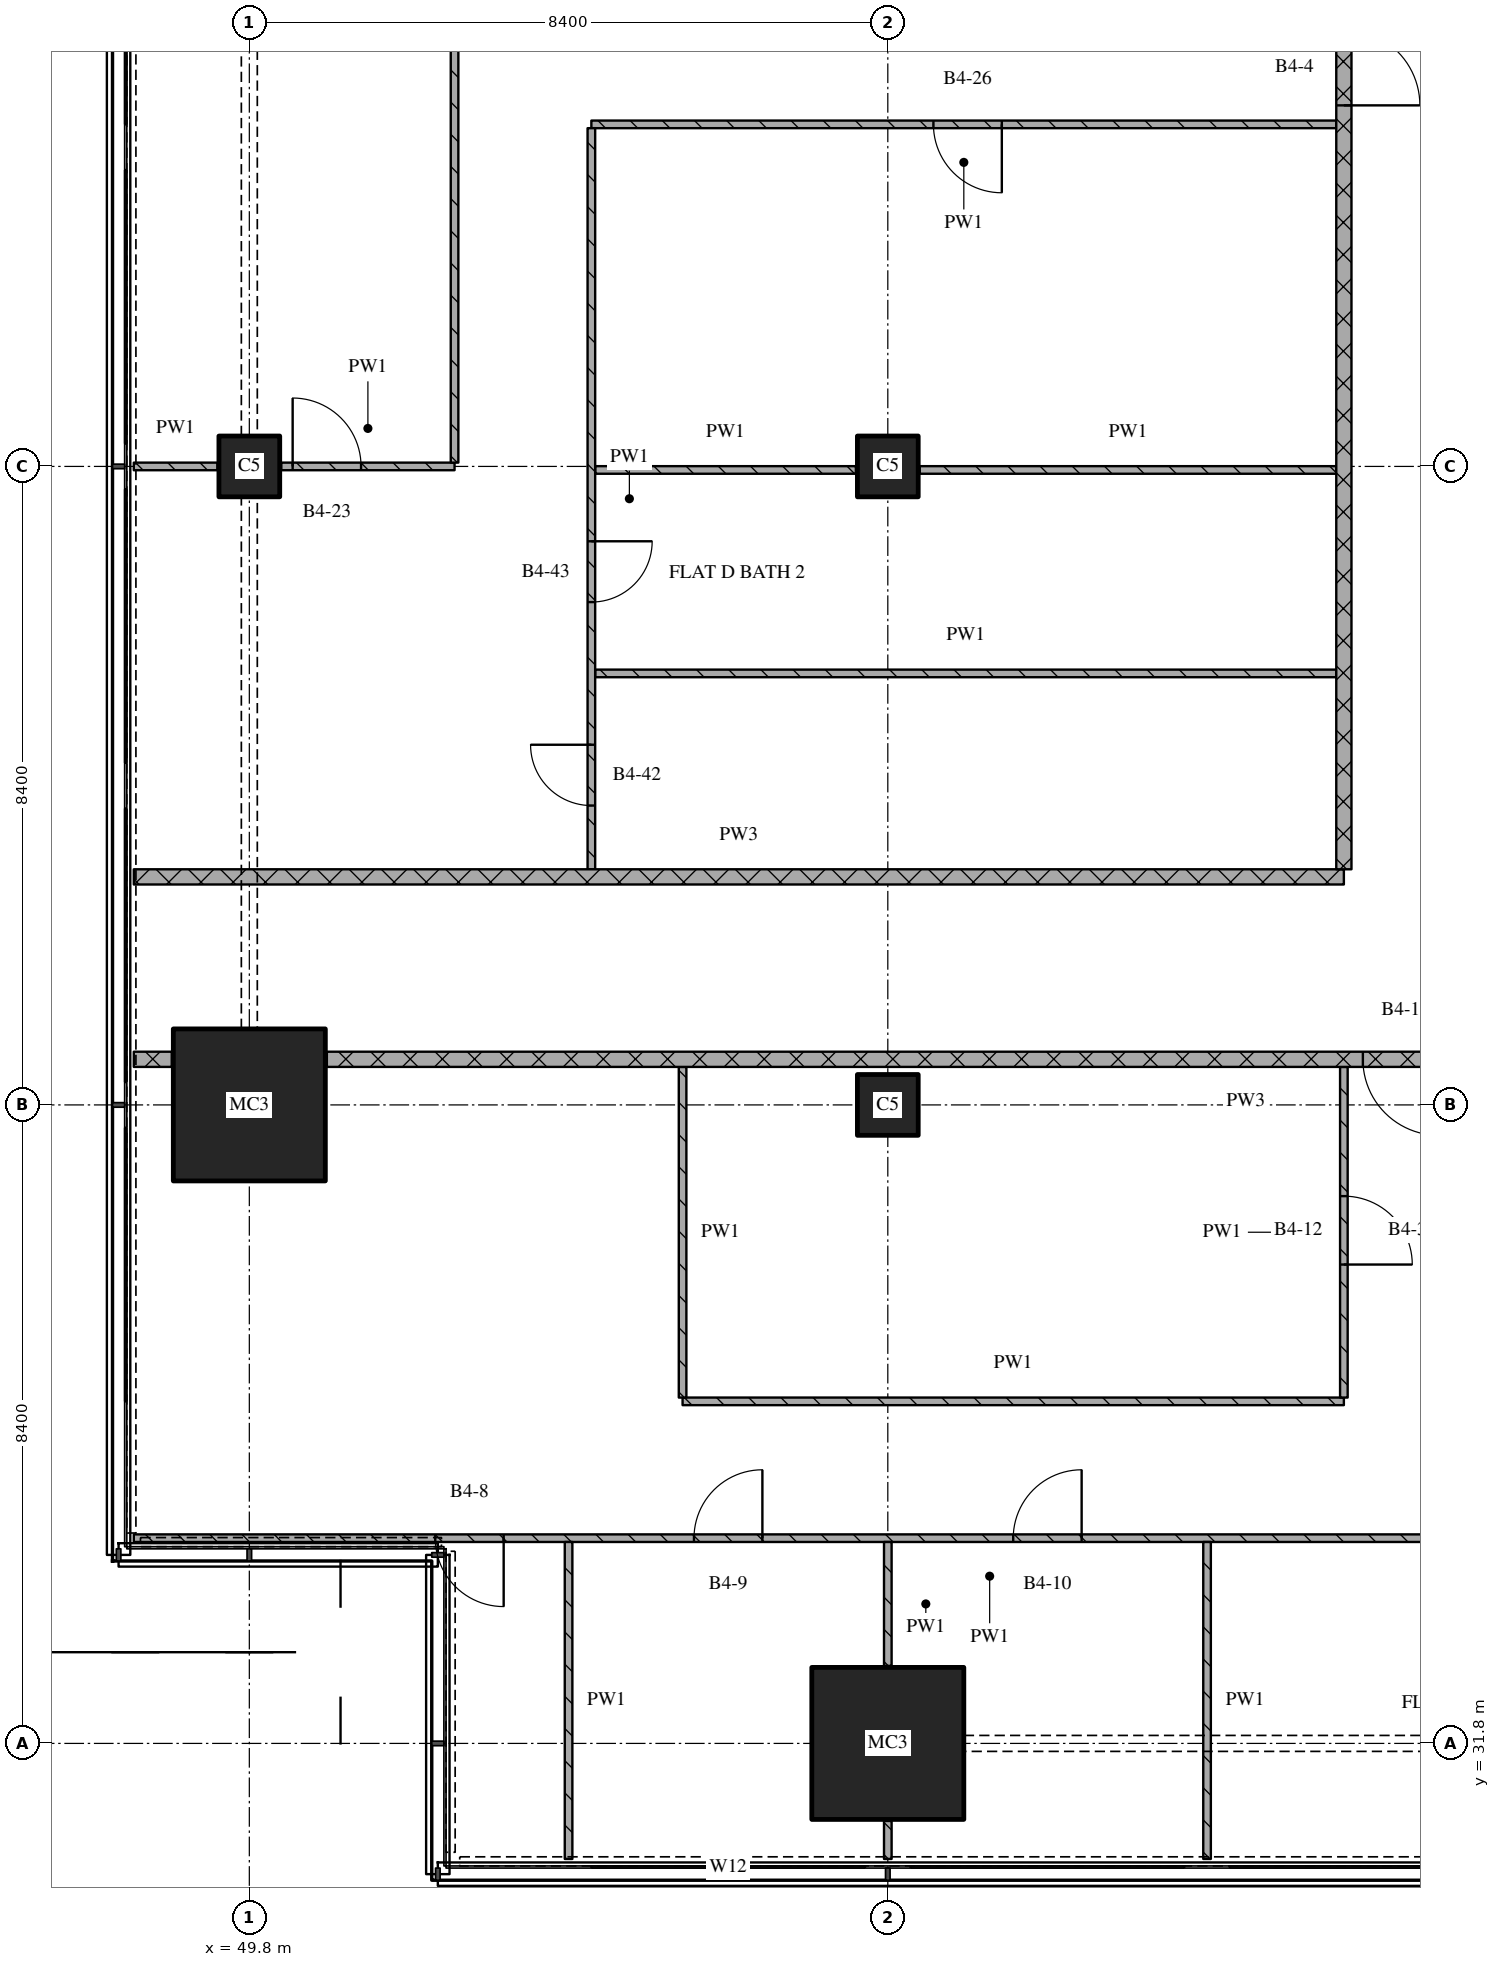
"""IFC4 building model, lengths in metres.
Left out: names, types, materials, properties, quantities, classifications, styles, units other than length and angle.
Written with IfcOpenShell. Run it as: python <this file> out.ifc"""

import sys

from ifc_helpers import new_model, si_unit, direction, frame, frame_2d, origin, origin_2d, place, context, subcontext, project, spatial, rectangle, extrude, element, fill, save


model = new_model("IFC4")
c1 = context("Model", 3, precision=1e-05, world=origin(), true_north=direction((0.0, 1.0)))
c2 = subcontext(c1, "Body", "Model", "MODEL_VIEW")
j1 = project(units=[si_unit("LENGTHUNIT", "METRE"), si_unit("PLANEANGLEUNIT", "RADIAN")], contexts=[c1])
p1 = place(None, origin())
s1 = spatial("IfcSite", under=j1, at=p1, CompositionType="ELEMENT")
p2 = place(p1, origin())
s2 = spatial("IfcBuilding", under=s1, at=p2, CompositionType="ELEMENT")
p3 = place(p2, frame((0.0, 0.0, 134.85)))
s3 = spatial("IfcBuildingStorey", under=s2, at=p3, CompositionType="ELEMENT", Elevation=134.85)
p4 = place(p3, frame((49.8, 40.2, 0.0), z_axis=(0.0, 0.0, 1.0), x_axis=(1.0, 0.0, 0.0)))
e1 = element("IfcColumn", 1, at=p4, inside=s3, PredefinedType="COLUMN", context=c2, shape_type="SweptSolid", body=[
    extrude(rectangle(XDim=2.0, YDim=2.0, at=origin_2d()), origin(), (0.0, 0.0, 1.0), 3.6),
])
p5 = place(p3, frame((49.8, 48.6, 0.0), z_axis=(0.0, 0.0, 1.0), x_axis=(1.0, 0.0, 0.0)))
e2 = element("IfcColumn", 2, at=p5, inside=s3, PredefinedType="COLUMN", context=c2, shape_type="SweptSolid", body=[
    extrude(rectangle(XDim=0.8, YDim=0.8, at=origin_2d()), origin(), (0.0, 0.0, 1.0), 3.6),
])
p6 = place(p3, frame((58.2, 31.8, 0.0), z_axis=(0.0, 0.0, 1.0), x_axis=(1.0, 0.0, 0.0)))
e3 = element("IfcColumn", 3, at=p6, inside=s3, PredefinedType="COLUMN", context=c2, shape_type="SweptSolid", body=[
    extrude(rectangle(XDim=2.0, YDim=2.0, at=origin_2d()), origin(), (0.0, 0.0, 1.0), 3.6),
])
for number, where, z_axis, x_axis in (
    (4, (58.2, 40.2, 0.0), (0.0, 0.0, 1.0), (1.0, 0.0, 0.0)),
    (5, (58.2, 48.6, 0.0), (0.0, 0.0, 1.0), (1.0, 0.0, 0.0)),
):
    element("IfcColumn", number, at=place(p3, frame(where, z_axis=z_axis, x_axis=x_axis)), inside=s3, PredefinedType="COLUMN", context=c2, shape_type="SweptSolid", body=[
        extrude(rectangle(XDim=0.8, YDim=0.8, at=origin_2d()), origin(), (0.0, 0.0, 1.0), 3.6),
    ])
p7 = place(p3, frame((70.8, 34.5, 0.0), z_axis=(0.0, 0.0, 1.0), x_axis=(-1.0, 0.0, 0.0)))
e6 = element("IfcWall", 6, at=p7, inside=s3, PredefinedType="PARTITIONING", context=c2, shape_type="SweptSolid", body=[
    extrude(rectangle(XDim=22.52, YDim=0.1, at=frame_2d((11.26, 0.0))), origin(), (0.0, 0.0, 1.0), 3.32),
])
p8 = place(p7, frame((10.05, 0.0, 0.0)))
e7 = element("IfcOpeningElement", 7, at=p8, cuts=e6, PredefinedType="OPENING", context=c2, shape_type="SweptSolid", body=[
    extrude(rectangle(XDim=0.9, YDim=2.1, at=frame_2d((0.45, 1.05))), frame((0.0, 0.06, 0.0), z_axis=(0.0, -1.0, 0.0), x_axis=(1.0, 0.0, 0.0)), (0.0, 0.0, 1.0), 0.12),
])
p9 = place(p7, frame((14.25, 0.0, 0.0)))
e8 = element("IfcOpeningElement", 8, at=p9, cuts=e6, PredefinedType="OPENING", context=c2, shape_type="SweptSolid", body=[
    extrude(rectangle(XDim=0.9, YDim=2.1, at=frame_2d((0.45, 1.05))), frame((0.0, 0.06, 0.0), z_axis=(0.0, -1.0, 0.0), x_axis=(1.0, 0.0, 0.0)), (0.0, 0.0, 1.0), 0.12),
])
p10 = place(p7, frame((17.654, 0.0, 0.0)))
e9 = element("IfcOpeningElement", 9, at=p10, cuts=e6, PredefinedType="OPENING", context=c2, shape_type="SweptSolid", body=[
    extrude(rectangle(XDim=0.9, YDim=2.1, at=frame_2d((0.45, 1.05))), frame((0.0, 0.06, 0.0), z_axis=(0.0, -1.0, 0.0), x_axis=(1.0, 0.0, 0.0)), (0.0, 0.0, 1.0), 0.12),
])
p11 = place(p3, frame((55.5, 36.3, 0.0), z_axis=(0.0, 0.0, 1.0), x_axis=(1.0, 0.0, 0.0)))
e10 = element("IfcWall", 10, at=p11, inside=s3, PredefinedType="PARTITIONING", context=c2, shape_type="SweptSolid", body=[
    extrude(rectangle(XDim=8.7, YDim=0.1, at=frame_2d((4.35, 0.0))), origin(), (0.0, 0.0, 1.0), 3.32),
])
p12 = place(p3, frame((48.28, 40.8, 0.0), z_axis=(0.0, 0.0, 1.0), x_axis=(1.0, 0.0, 0.0)))
e11 = element("IfcWall", 11, at=p12, inside=s3, PredefinedType="PARTITIONING", context=c2, shape_type="SweptSolid", body=[
    extrude(rectangle(XDim=0.5, YDim=0.2, at=frame_2d((0.25, 0.0))), origin(), (0.0, 0.0, 1.0), 3.32),
])
p13 = place(p3, frame((75.0, 40.8, 0.0), z_axis=(0.0, 0.0, 1.0), x_axis=(-1.0, 0.0, 0.0)))
e12 = element("IfcWall", 12, at=p13, inside=s3, PredefinedType="PARTITIONING", context=c2, shape_type="SweptSolid", body=[
    extrude(rectangle(XDim=24.18, YDim=0.2, at=frame_2d((12.09, 0.0))), origin(), (0.0, 0.0, 1.0), 3.32),
])
p14 = place(p13, frame((9.55, 0.0, 0.0)))
e13 = element("IfcOpeningElement", 13, at=p14, cuts=e12, PredefinedType="OPENING", context=c2, shape_type="SweptSolid", body=[
    extrude(rectangle(XDim=1.0, YDim=2.1, at=frame_2d((0.5, 1.05))), frame((0.0, 0.11, 0.0), z_axis=(0.0, -1.0, 0.0), x_axis=(1.0, 0.0, 0.0)), (0.0, 0.0, 1.0), 0.22),
])
p15 = place(p3, frame((48.28, 43.2, 0.0), z_axis=(0.0, 0.0, 1.0), x_axis=(1.0, 0.0, 0.0)))
e14 = element("IfcWall", 14, at=p15, inside=s3, PredefinedType="PARTITIONING", context=c2, shape_type="SweptSolid", body=[
    extrude(rectangle(XDim=15.92, YDim=0.2, at=frame_2d((7.96, 0.0))), origin(), (0.0, 0.0, 1.0), 3.32),
])
p16 = place(p3, frame((54.35, 45.877, 0.0), z_axis=(0.0, 0.0, 1.0), x_axis=(1.0, 0.0, 0.0)))
e15 = element("IfcWall", 15, at=p16, inside=s3, PredefinedType="PARTITIONING", context=c2, shape_type="SweptSolid", body=[
    extrude(rectangle(XDim=9.75, YDim=0.1, at=frame_2d((4.875, 0.0))), origin(), (0.0, 0.0, 1.0), 3.32),
])
p17 = place(p3, frame((54.35, 48.553, 0.0), z_axis=(0.0, 0.0, 1.0), x_axis=(1.0, 0.0, 0.0)))
e16 = element("IfcWall", 16, at=p17, inside=s3, PredefinedType="PARTITIONING", context=c2, shape_type="SweptSolid", body=[
    extrude(rectangle(XDim=3.43, YDim=0.1, at=frame_2d((1.715, 0.0))), origin(), (0.0, 0.0, 1.0), 3.32),
])
p18 = place(p3, frame((58.62, 48.553, 0.0), z_axis=(0.0, 0.0, 1.0), x_axis=(1.0, 0.0, 0.0)))
e17 = element("IfcWall", 17, at=p18, inside=s3, PredefinedType="PARTITIONING", context=c2, shape_type="SweptSolid", body=[
    extrude(rectangle(XDim=5.48, YDim=0.1, at=frame_2d((2.74, 0.0))), origin(), (0.0, 0.0, 1.0), 3.32),
])
p19 = place(p3, frame((48.28, 48.6, 0.0), z_axis=(0.0, 0.0, 1.0), x_axis=(1.0, 0.0, 0.0)))
e18 = element("IfcWall", 18, at=p19, inside=s3, PredefinedType="PARTITIONING", context=c2, shape_type="SweptSolid", body=[
    extrude(rectangle(XDim=1.1, YDim=0.1, at=frame_2d((0.55, 0.0))), origin(), (0.0, 0.0, 1.0), 3.32),
])
p20 = place(p3, frame((50.22, 48.6, 0.0), z_axis=(0.0, 0.0, 1.0), x_axis=(1.0, 0.0, 0.0)))
e19 = element("IfcWall", 19, at=p20, inside=s3, PredefinedType="PARTITIONING", context=c2, shape_type="SweptSolid", body=[
    extrude(rectangle(XDim=2.28, YDim=0.1, at=frame_2d((1.14, 0.0))), origin(), (0.0, 0.0, 1.0), 3.32),
])
p21 = place(p20, frame((0.15, 0.0, 0.0)))
e20 = element("IfcOpeningElement", 20, at=p21, cuts=e19, PredefinedType="OPENING", context=c2, shape_type="SweptSolid", body=[
    extrude(rectangle(XDim=0.9, YDim=2.1, at=frame_2d((0.45, 1.05))), frame((0.0, 0.06, 0.0), z_axis=(0.0, -1.0, 0.0), x_axis=(1.0, 0.0, 0.0)), (0.0, 0.0, 1.0), 0.12),
])
p22 = place(p3, frame((64.1, 53.1, 0.0), z_axis=(0.0, 0.0, 1.0), x_axis=(-1.0, 0.0, 0.0)))
e21 = element("IfcWall", 21, at=p22, inside=s3, PredefinedType="PARTITIONING", context=c2, shape_type="SweptSolid", body=[
    extrude(rectangle(XDim=9.8, YDim=0.1, at=frame_2d((4.9, 0.0))), origin(), (0.0, 0.0, 1.0), 3.32),
])
p23 = place(p22, frame((4.4, 0.0, 0.0)))
e22 = element("IfcOpeningElement", 22, at=p23, cuts=e21, PredefinedType="OPENING", context=c2, shape_type="SweptSolid", body=[
    extrude(rectangle(XDim=0.9, YDim=2.1, at=frame_2d((0.45, 1.05))), frame((0.0, 0.06, 0.0), z_axis=(0.0, -1.0, 0.0), x_axis=(1.0, 0.0, 0.0)), (0.0, 0.0, 1.0), 0.12),
])
p24 = place(p3, frame((52.5, 48.65, 0.0), z_axis=(0.0, 0.0, 1.0), x_axis=(0.0, 1.0, 0.0)))
e23 = element("IfcWall", 23, at=p24, inside=s3, PredefinedType="PARTITIONING", context=c2, shape_type="SweptSolid", body=[
    extrude(rectangle(XDim=16.65, YDim=0.1, at=frame_2d((8.325, 0.0))), origin(), (0.0, 0.0, 1.0), 3.32),
])
p25 = place(p24, frame((12.1, 0.0, 0.0)))
e24 = element("IfcOpeningElement", 24, at=p25, cuts=e23, PredefinedType="OPENING", context=c2, shape_type="SweptSolid", body=[
    extrude(rectangle(XDim=0.9, YDim=2.1, at=frame_2d((0.45, 1.05))), frame((0.0, 0.06, 0.0), z_axis=(0.0, -1.0, 0.0), x_axis=(1.0, 0.0, 0.0)), (0.0, 0.0, 1.0), 0.12),
])
p26 = place(p3, frame((54.0, 34.45, 0.0), z_axis=(0.0, 0.0, 1.0), x_axis=(0.0, -1.0, 0.0)))
e25 = element("IfcWall", 25, at=p26, inside=s3, PredefinedType="PARTITIONING", context=c2, shape_type="SweptSolid", body=[
    extrude(rectangle(XDim=4.17, YDim=0.1, at=frame_2d((2.085, 0.0))), origin(), (0.0, 0.0, 1.0), 3.32),
])
p27 = place(p3, frame((54.3, 53.05, 0.0), z_axis=(0.0, 0.0, 1.0), x_axis=(0.0, -1.0, 0.0)))
e26 = element("IfcWall", 26, at=p27, inside=s3, PredefinedType="PARTITIONING", context=c2, shape_type="SweptSolid", body=[
    extrude(rectangle(XDim=9.75, YDim=0.1, at=frame_2d((4.875, 0.0))), origin(), (0.0, 0.0, 1.0), 3.32),
])
p28 = place(p27, frame((5.435, 0.0, 0.0)))
e27 = element("IfcOpeningElement", 27, at=p28, cuts=e26, PredefinedType="OPENING", context=c2, shape_type="SweptSolid", body=[
    extrude(rectangle(XDim=0.8, YDim=2.1, at=frame_2d((0.4, 1.05))), frame((0.0, 0.06, 0.0), z_axis=(0.0, -1.0, 0.0), x_axis=(1.0, 0.0, 0.0)), (0.0, 0.0, 1.0), 0.12),
])
p29 = place(p27, frame((8.112, 0.0, 0.0)))
e28 = element("IfcOpeningElement", 28, at=p29, cuts=e26, PredefinedType="OPENING", context=c2, shape_type="SweptSolid", body=[
    extrude(rectangle(XDim=0.8, YDim=2.1, at=frame_2d((0.4, 1.05))), frame((0.0, 0.06, 0.0), z_axis=(0.0, -1.0, 0.0), x_axis=(1.0, 0.0, 0.0)), (0.0, 0.0, 1.0), 0.12),
])
p30 = place(p3, frame((55.5, 40.7, 0.0), z_axis=(0.0, 0.0, 1.0), x_axis=(0.0, -1.0, 0.0)))
e29 = element("IfcWall", 29, at=p30, inside=s3, PredefinedType="PARTITIONING", context=c2, shape_type="SweptSolid", body=[
    extrude(rectangle(XDim=4.35, YDim=0.1, at=frame_2d((2.175, 0.0))), origin(), (0.0, 0.0, 1.0), 3.32),
])
p31 = place(p3, frame((58.2, 30.78, 0.0), z_axis=(0.0, 0.0, 1.0), x_axis=(0.0, -1.0, 0.0)))
e30 = element("IfcWall", 30, at=p31, inside=s3, PredefinedType="PARTITIONING", context=c2, shape_type="SweptSolid", body=[
    extrude(rectangle(XDim=0.5, YDim=0.1, at=frame_2d((0.25, 0.0))), origin(), (0.0, 0.0, 1.0), 3.32),
])
p32 = place(p3, frame((58.2, 34.45, 0.0), z_axis=(0.0, 0.0, 1.0), x_axis=(0.0, -1.0, 0.0)))
e31 = element("IfcWall", 31, at=p32, inside=s3, PredefinedType="PARTITIONING", context=c2, shape_type="SweptSolid", body=[
    extrude(rectangle(XDim=1.63, YDim=0.1, at=frame_2d((0.815, 0.0))), origin(), (0.0, 0.0, 1.0), 3.32),
])
p33 = place(p3, frame((62.4, 34.45, 0.0), z_axis=(0.0, 0.0, 1.0), x_axis=(0.0, -1.0, 0.0)))
e32 = element("IfcWall", 32, at=p33, inside=s3, PredefinedType="PARTITIONING", context=c2, shape_type="SweptSolid", body=[
    extrude(rectangle(XDim=4.17, YDim=0.1, at=frame_2d((2.085, 0.0))), origin(), (0.0, 0.0, 1.0), 3.32),
])
p34 = place(p3, frame((64.2, 43.3, 0.0), z_axis=(0.0, 0.0, 1.0), x_axis=(0.0, 1.0, 0.0)))
e33 = element("IfcWall", 33, at=p34, inside=s3, PredefinedType="PARTITIONING", context=c2, shape_type="SweptSolid", body=[
    extrude(rectangle(XDim=32.02, YDim=0.2, at=frame_2d((16.01, 0.0))), origin(), (0.0, 0.0, 1.0), 3.32),
])
p35 = place(p34, frame((10.05, 0.0, 0.0)))
e34 = element("IfcOpeningElement", 34, at=p35, cuts=e33, PredefinedType="OPENING", context=c2, shape_type="SweptSolid", body=[
    extrude(rectangle(XDim=1.0, YDim=2.1, at=frame_2d((0.5, 1.05))), frame((0.0, 0.11, 0.0), z_axis=(0.0, -1.0, 0.0), x_axis=(1.0, 0.0, 0.0)), (0.0, 0.0, 1.0), 0.22),
])
p36 = place(p34, frame((25.65, 0.0, 0.0)))
e35 = element("IfcOpeningElement", 35, at=p36, cuts=e33, PredefinedType="OPENING", context=c2, shape_type="SweptSolid", body=[
    extrude(rectangle(XDim=1.0, YDim=2.1, at=frame_2d((0.5, 1.05))), frame((0.0, 0.11, 0.0), z_axis=(0.0, -1.0, 0.0), x_axis=(1.0, 0.0, 0.0)), (0.0, 0.0, 1.0), 0.22),
])
p37 = place(p3, frame((64.2, 36.35, 0.0), z_axis=(0.0, 0.0, 1.0), x_axis=(0.0, 1.0, 0.0)))
e36 = element("IfcWall", 36, at=p37, inside=s3, PredefinedType="PARTITIONING", context=c2, shape_type="SweptSolid", body=[
    extrude(rectangle(XDim=4.35, YDim=0.1, at=frame_2d((2.175, 0.0))), origin(), (0.0, 0.0, 1.0), 3.32),
])
p38 = place(p37, frame((1.75, 0.0, 0.0)))
e37 = element("IfcOpeningElement", 37, at=p38, cuts=e36, PredefinedType="OPENING", context=c2, shape_type="SweptSolid", body=[
    extrude(rectangle(XDim=0.9, YDim=2.1, at=frame_2d((0.45, 1.05))), frame((0.0, 0.06, 0.0), z_axis=(0.0, -1.0, 0.0), x_axis=(1.0, 0.0, 0.0)), (0.0, 0.0, 1.0), 0.12),
])
p39 = place(p8, origin())
e38 = element("IfcDoor", 38, at=p39, inside=s3, OperationType="SINGLE_SWING_RIGHT", PredefinedType="DOOR", context=c2, shape_type="SweptSolid", body=[
    extrude(rectangle(XDim=0.9, YDim=2.1, at=frame_2d((0.45, 1.05))), frame((0.0, 0.025, 0.0), z_axis=(0.0, -1.0, 0.0), x_axis=(1.0, 0.0, 0.0)), (0.0, 0.0, 1.0), 0.05),
])
fill(e7, e38)
p40 = place(p9, origin())
e39 = element("IfcDoor", 39, at=p40, inside=s3, OperationType="SINGLE_SWING_RIGHT", PredefinedType="DOOR", context=c2, shape_type="SweptSolid", body=[
    extrude(rectangle(XDim=0.9, YDim=2.1, at=frame_2d((0.45, 1.05))), frame((0.0, 0.025, 0.0), z_axis=(0.0, -1.0, 0.0), x_axis=(1.0, 0.0, 0.0)), (0.0, 0.0, 1.0), 0.05),
])
fill(e8, e39)
p41 = place(p10, origin())
e40 = element("IfcDoor", 40, at=p41, inside=s3, OperationType="SINGLE_SWING_LEFT", PredefinedType="DOOR", context=c2, shape_type="SweptSolid", body=[
    extrude(rectangle(XDim=0.9, YDim=2.1, at=frame_2d((0.45, 1.05))), frame((0.0, 0.025, 0.0), z_axis=(0.0, -1.0, 0.0), x_axis=(1.0, 0.0, 0.0)), (0.0, 0.0, 1.0), 0.05),
])
fill(e9, e40)
p42 = place(p14, origin())
e41 = element("IfcDoor", 41, at=p42, inside=s3, OperationType="SINGLE_SWING_LEFT", PredefinedType="DOOR", context=c2, shape_type="SweptSolid", body=[
    extrude(rectangle(XDim=1.0, YDim=2.1, at=frame_2d((0.5, 1.05))), frame((0.0, 0.025, 0.0), z_axis=(0.0, -1.0, 0.0), x_axis=(1.0, 0.0, 0.0)), (0.0, 0.0, 1.0), 0.05),
])
fill(e13, e41)
p43 = place(p21, origin())
e42 = element("IfcDoor", 42, at=p43, inside=s3, OperationType="SINGLE_SWING_LEFT", PredefinedType="DOOR", context=c2, shape_type="SweptSolid", body=[
    extrude(rectangle(XDim=0.9, YDim=2.1, at=frame_2d((0.45, 1.05))), frame((0.0, 0.025, 0.0), z_axis=(0.0, -1.0, 0.0), x_axis=(1.0, 0.0, 0.0)), (0.0, 0.0, 1.0), 0.05),
])
fill(e20, e42)
p44 = place(p23, origin())
e43 = element("IfcDoor", 43, at=p44, inside=s3, OperationType="SINGLE_SWING_LEFT", PredefinedType="DOOR", context=c2, shape_type="SweptSolid", body=[
    extrude(rectangle(XDim=0.9, YDim=2.1, at=frame_2d((0.45, 1.05))), frame((0.0, 0.025, 0.0), z_axis=(0.0, -1.0, 0.0), x_axis=(1.0, 0.0, 0.0)), (0.0, 0.0, 1.0), 0.05),
])
fill(e22, e43)
p45 = place(p28, origin())
e44 = element("IfcDoor", 44, at=p45, inside=s3, OperationType="SINGLE_SWING_LEFT", PredefinedType="DOOR", context=c2, shape_type="SweptSolid", body=[
    extrude(rectangle(XDim=0.8, YDim=2.1, at=frame_2d((0.4, 1.05))), frame((0.0, 0.025, 0.0), z_axis=(0.0, -1.0, 0.0), x_axis=(1.0, 0.0, 0.0)), (0.0, 0.0, 1.0), 0.05),
])
fill(e27, e44)
p46 = place(p29, origin())
e45 = element("IfcDoor", 45, at=p46, inside=s3, OperationType="SINGLE_SWING_RIGHT", PredefinedType="DOOR", context=c2, shape_type="SweptSolid", body=[
    extrude(rectangle(XDim=0.8, YDim=2.1, at=frame_2d((0.4, 1.05))), frame((0.0, 0.025, 0.0), z_axis=(0.0, -1.0, 0.0), x_axis=(1.0, 0.0, 0.0)), (0.0, 0.0, 1.0), 0.05),
])
fill(e28, e45)
p47 = place(p35, origin())
e46 = element("IfcDoor", 46, at=p47, inside=s3, OperationType="SINGLE_SWING_RIGHT", PredefinedType="DOOR", context=c2, shape_type="SweptSolid", body=[
    extrude(rectangle(XDim=1.0, YDim=2.1, at=frame_2d((0.5, 1.05))), frame((0.0, 0.025, 0.0), z_axis=(0.0, -1.0, 0.0), x_axis=(1.0, 0.0, 0.0)), (0.0, 0.0, 1.0), 0.05),
])
fill(e34, e46)
p48 = place(p38, origin())
e47 = element("IfcDoor", 47, at=p48, inside=s3, OperationType="SINGLE_SWING_RIGHT", PredefinedType="DOOR", context=c2, shape_type="SweptSolid", body=[
    extrude(rectangle(XDim=0.9, YDim=2.1, at=frame_2d((0.45, 1.05))), frame((0.0, 0.025, 0.0), z_axis=(0.0, -1.0, 0.0), x_axis=(1.0, 0.0, 0.0)), (0.0, 0.0, 1.0), 0.05),
])
fill(e37, e47)
save(model, sys.argv[1])
